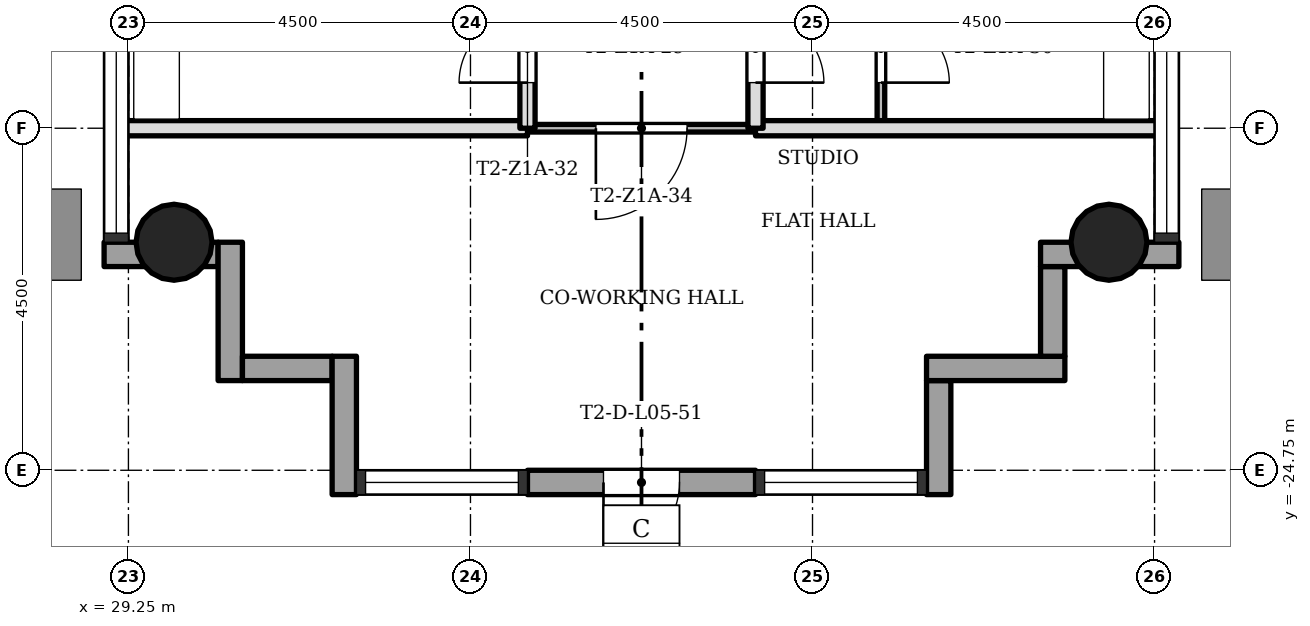
"""IFC4 building model, lengths in metres.
Left out: names, types, materials, properties, quantities, classifications, styles, units other than length and angle.
Written with IfcOpenShell. Run it as: python <this file> out.ifc"""

import sys

from ifc_helpers import new_model, si_unit, direction, frame, frame_2d, origin, origin_2d, place, context, subcontext, project, spatial, rectangle, hollow_circle, extrude, element, fill, save


model = new_model("IFC4")
c1 = context("Model", 3, precision=1e-05, world=origin(), true_north=direction((0.0, 1.0)))
c2 = subcontext(c1, "Body", "Model", "MODEL_VIEW")
j1 = project(units=[si_unit("LENGTHUNIT", "METRE"), si_unit("PLANEANGLEUNIT", "RADIAN")], contexts=[c1])
p1 = place(None, origin())
s1 = spatial("IfcSite", under=j1, at=p1, CompositionType="ELEMENT")
p2 = place(p1, origin())
s2 = spatial("IfcBuilding", under=s1, at=p2, CompositionType="ELEMENT")
p3 = place(p2, frame((0.0, 0.0, 24.5)))
s3 = spatial("IfcBuildingStorey", under=s2, at=p3, CompositionType="ELEMENT", Elevation=24.5)
for number, where, z_axis, x_axis in (
    (1, (42.15, -21.75, 0.0), (0.0, 0.0, 1.0), (1.0, 0.0, 0.0)),
    (2, (29.85, -21.75, 0.0), (0.0, 0.0, 1.0), (1.0, 0.0, 0.0)),
):
    element("IfcColumn", number, at=place(p3, frame(where, z_axis=z_axis, x_axis=x_axis)), inside=s3, PredefinedType="COLUMN", context=c2, shape_type="SweptSolid", body=[
        extrude(hollow_circle(Radius=0.5, WallThickness=0.036, at=origin_2d()), origin(), (0.0, 0.0, 1.0), 3.4),
    ])
p4 = place(p3, frame((39.91, -25.07, 0.0), z_axis=(0.0, 0.0, 1.0), x_axis=(0.0, 1.0, 0.0)))
e3 = element("IfcWall", 3, at=p4, inside=s3, PredefinedType="STANDARD", context=c2, shape_type="SweptSolid", body=[
    extrude(rectangle(XDim=1.5, YDim=0.32, at=frame_2d((0.75, 0.0))), origin(), (0.0, 0.0, 1.0), 3.1),
])
p5 = place(p3, frame((39.75, -23.41, 0.0), z_axis=(0.0, 0.0, 1.0), x_axis=(1.0, 0.0, 0.0)))
e4 = element("IfcWall", 4, at=p5, inside=s3, PredefinedType="STANDARD", context=c2, shape_type="SweptSolid", body=[
    extrude(rectangle(XDim=1.82, YDim=0.32, at=frame_2d((0.91, 0.0))), origin(), (0.0, 0.0, 1.0), 3.1),
])
p6 = place(p3, frame((41.41, -23.25, 0.0), z_axis=(0.0, 0.0, 1.0), x_axis=(0.0, 1.0, 0.0)))
e5 = element("IfcWall", 5, at=p6, inside=s3, PredefinedType="STANDARD", context=c2, shape_type="SweptSolid", body=[
    extrude(rectangle(XDim=1.18, YDim=0.32, at=frame_2d((0.59, 0.0))), origin(), (0.0, 0.0, 1.0), 3.1),
])
p7 = place(p3, frame((41.25, -21.91, 0.0), z_axis=(0.0, 0.0, 1.0), x_axis=(1.0, 0.0, 0.0)))
e6 = element("IfcWall", 6, at=p7, inside=s3, PredefinedType="STANDARD", context=c2, shape_type="SweptSolid", body=[
    extrude(rectangle(XDim=1.82, YDim=0.32, at=frame_2d((0.91, 0.0))), origin(), (0.0, 0.0, 1.0), 3.1),
])
p8 = place(p3, frame((28.93, -21.91, 0.0), z_axis=(0.0, 0.0, 1.0), x_axis=(1.0, 0.0, 0.0)))
e7 = element("IfcWall", 7, at=p8, inside=s3, PredefinedType="STANDARD", context=c2, shape_type="SweptSolid", body=[
    extrude(rectangle(XDim=1.5, YDim=0.32, at=frame_2d((0.75, 0.0))), origin(), (0.0, 0.0, 1.0), 3.1),
])
p9 = place(p3, frame((30.59, -21.75, 0.0), z_axis=(0.0, 0.0, 1.0), x_axis=(0.0, -1.0, 0.0)))
e8 = element("IfcWall", 8, at=p9, inside=s3, PredefinedType="STANDARD", context=c2, shape_type="SweptSolid", body=[
    extrude(rectangle(XDim=1.82, YDim=0.32, at=frame_2d((0.91, 0.0))), origin(), (0.0, 0.0, 1.0), 3.1),
])
p10 = place(p3, frame((30.75, -23.41, 0.0), z_axis=(0.0, 0.0, 1.0), x_axis=(1.0, 0.0, 0.0)))
e9 = element("IfcWall", 9, at=p10, inside=s3, PredefinedType="STANDARD", context=c2, shape_type="SweptSolid", body=[
    extrude(rectangle(XDim=1.18, YDim=0.32, at=frame_2d((0.59, 0.0))), origin(), (0.0, 0.0, 1.0), 3.1),
])
p11 = place(p3, frame((32.09, -23.25, 0.0), z_axis=(0.0, 0.0, 1.0), x_axis=(0.0, -1.0, 0.0)))
e10 = element("IfcWall", 10, at=p11, inside=s3, PredefinedType="STANDARD", context=c2, shape_type="SweptSolid", body=[
    extrude(rectangle(XDim=1.82, YDim=0.32, at=frame_2d((0.91, 0.0))), origin(), (0.0, 0.0, 1.0), 3.1),
])
p12 = place(p3, frame((34.5, -24.91, 0.0), z_axis=(0.0, 0.0, 1.0), x_axis=(1.0, 0.0, 0.0)))
e11 = element("IfcWall", 11, at=p12, inside=s3, PredefinedType="STANDARD", context=c2, shape_type="SweptSolid", body=[
    extrude(rectangle(XDim=3.0, YDim=0.32, at=frame_2d((1.5, 0.0))), origin(), (0.0, 0.0, 1.0), 3.1),
])
p13 = place(p12, frame((1.0, 0.0, 0.0)))
e12 = element("IfcOpeningElement", 12, at=p13, cuts=e11, PredefinedType="OPENING", context=c2, shape_type="SweptSolid", body=[
    extrude(rectangle(XDim=1.0, YDim=2.1, at=frame_2d((0.5, 1.05))), frame((0.0, 0.17, 0.0), z_axis=(0.0, -1.0, 0.0), x_axis=(1.0, 0.0, 0.0)), (0.0, 0.0, 1.0), 0.34),
])
p14 = place(p3, frame((37.5, -20.25, 0.0), z_axis=(0.0, 0.0, 1.0), x_axis=(-1.0, 0.0, 0.0)))
e13 = element("IfcWall", 13, at=p14, inside=s3, PredefinedType="PARTITIONING", context=c2, shape_type="SweptSolid", body=[
    extrude(rectangle(XDim=3.0, YDim=0.1, at=frame_2d((1.5, 0.0))), origin(), (0.0, 0.0, 1.0), 3.0),
])
p15 = place(p14, frame((0.9, 0.0, 0.0)))
e14 = element("IfcOpeningElement", 14, at=p15, cuts=e13, PredefinedType="OPENING", context=c2, shape_type="SweptSolid", body=[
    extrude(rectangle(XDim=1.2, YDim=2.1, at=frame_2d((0.6, 1.05))), frame((0.0, 0.06, 0.0), z_axis=(0.0, -1.0, 0.0), x_axis=(1.0, 0.0, 0.0)), (0.0, 0.0, 1.0), 0.12),
])
for number, where, z_axis, x_axis in (
    (15, (42.85, -20.25, 0.0), (0.0, 0.0, 1.0), (-1.0, 0.0, 0.0)),
    (16, (34.5, -20.25, 0.0), (0.0, 0.0, 1.0), (-1.0, 0.0, 0.0)),
):
    element("IfcWall", number, at=place(p3, frame(where, z_axis=z_axis, x_axis=x_axis)), inside=s3, PredefinedType="SOLIDWALL", context=c2, shape_type="SweptSolid", body=[
        extrude(rectangle(XDim=5.35, YDim=0.2, at=frame_2d((2.675, 0.0))), origin(), (0.0, 0.0, 1.0), 3.0),
    ])
p16 = place(p3, frame((39.15, -20.25, 0.0), z_axis=(0.0, 0.0, 1.0), x_axis=(0.0, 1.0, 0.0)))
e17 = element("IfcWall", 17, at=p16, inside=s3, PredefinedType="PARTITIONING", context=c2, shape_type="SweptSolid", body=[
    extrude(rectangle(XDim=4.5, YDim=0.1, at=frame_2d((2.25, 0.0))), origin(), (0.0, 0.0, 1.0), 3.0),
])
p17 = place(p16, frame((0.6, 0.0, 0.0)))
e18 = element("IfcOpeningElement", 18, at=p17, cuts=e17, PredefinedType="OPENING", context=c2, shape_type="SweptSolid", body=[
    extrude(rectangle(XDim=0.9, YDim=2.1, at=frame_2d((0.45, 1.05))), frame((0.0, 0.06, 0.0), z_axis=(0.0, -1.0, 0.0), x_axis=(1.0, 0.0, 0.0)), (0.0, 0.0, 1.0), 0.12),
])
p18 = place(p3, frame((37.5, -20.25, 0.0), z_axis=(0.0, 0.0, 1.0), x_axis=(0.0, 1.0, 0.0)))
e19 = element("IfcWall", 19, at=p18, inside=s3, PredefinedType="SOLIDWALL", context=c2, shape_type="SweptSolid", body=[
    extrude(rectangle(XDim=4.5, YDim=0.2, at=frame_2d((2.25, 0.0))), origin(), (0.0, 0.0, 1.0), 3.0),
])
p19 = place(p18, frame((0.6, 0.0, 0.0)))
e20 = element("IfcOpeningElement", 20, at=p19, cuts=e19, PredefinedType="OPENING", context=c2, shape_type="SweptSolid", body=[
    extrude(rectangle(XDim=0.9, YDim=2.1, at=frame_2d((0.45, 1.05))), frame((0.0, 0.11, 0.0), z_axis=(0.0, -1.0, 0.0), x_axis=(1.0, 0.0, 0.0)), (0.0, 0.0, 1.0), 0.22),
])
p20 = place(p3, frame((34.5, -20.25, 0.0), z_axis=(0.0, 0.0, 1.0), x_axis=(0.0, 1.0, 0.0)))
e21 = element("IfcWall", 21, at=p20, inside=s3, PredefinedType="SOLIDWALL", context=c2, shape_type="SweptSolid", body=[
    extrude(rectangle(XDim=4.5, YDim=0.2, at=frame_2d((2.25, 0.0))), origin(), (0.0, 0.0, 1.0), 3.0),
])
p21 = place(p20, frame((0.6, 0.0, 0.0)))
e22 = element("IfcOpeningElement", 22, at=p21, cuts=e21, PredefinedType="OPENING", context=c2, shape_type="SweptSolid", body=[
    extrude(rectangle(XDim=0.9, YDim=2.1, at=frame_2d((0.45, 1.05))), frame((0.0, 0.11, 0.0), z_axis=(0.0, -1.0, 0.0), x_axis=(1.0, 0.0, 0.0)), (0.0, 0.0, 1.0), 0.22),
])
p22 = place(p13, origin())
e23 = element("IfcDoor", 23, at=p22, inside=s3, OperationType="SINGLE_SWING_LEFT", PredefinedType="DOOR", context=c2, shape_type="SweptSolid", body=[
    extrude(rectangle(XDim=1.0, YDim=2.1, at=frame_2d((0.5, 1.05))), frame((0.0, 0.025, 0.0), z_axis=(0.0, -1.0, 0.0), x_axis=(1.0, 0.0, 0.0)), (0.0, 0.0, 1.0), 0.05),
])
fill(e12, e23)
p23 = place(p19, origin())
e24 = element("IfcDoor", 24, at=p23, inside=s3, OperationType="SINGLE_SWING_LEFT", PredefinedType="DOOR", context=c2, shape_type="SweptSolid", body=[
    extrude(rectangle(XDim=0.9, YDim=2.1, at=frame_2d((0.45, 1.05))), frame((0.0, 0.025, 0.0), z_axis=(0.0, -1.0, 0.0), x_axis=(1.0, 0.0, 0.0)), (0.0, 0.0, 1.0), 0.05),
])
fill(e20, e24)
p24 = place(p17, origin())
e25 = element("IfcDoor", 25, at=p24, inside=s3, OperationType="SINGLE_SWING_LEFT", PredefinedType="DOOR", context=c2, shape_type="SweptSolid", body=[
    extrude(rectangle(XDim=0.9, YDim=2.1, at=frame_2d((0.45, 1.05))), frame((0.0, 0.025, 0.0), z_axis=(0.0, -1.0, 0.0), x_axis=(1.0, 0.0, 0.0)), (0.0, 0.0, 1.0), 0.05),
])
fill(e18, e25)
p25 = place(p21, origin())
e26 = element("IfcDoor", 26, at=p25, inside=s3, OperationType="SINGLE_SWING_RIGHT", PredefinedType="DOOR", context=c2, shape_type="SweptSolid", body=[
    extrude(rectangle(XDim=0.9, YDim=2.1, at=frame_2d((0.45, 1.05))), frame((0.0, 0.025, 0.0), z_axis=(0.0, -1.0, 0.0), x_axis=(1.0, 0.0, 0.0)), (0.0, 0.0, 1.0), 0.05),
])
fill(e22, e26)
p26 = place(p15, origin())
e27 = element("IfcDoor", 27, at=p26, inside=s3, OperationType="SINGLE_SWING_LEFT", PredefinedType="DOOR", context=c2, shape_type="SweptSolid", body=[
    extrude(rectangle(XDim=1.2, YDim=2.1, at=frame_2d((0.6, 1.05))), frame((0.0, 0.025, 0.0), z_axis=(0.0, -1.0, 0.0), x_axis=(1.0, 0.0, 0.0)), (0.0, 0.0, 1.0), 0.05),
])
fill(e14, e27)
save(model, sys.argv[1])
